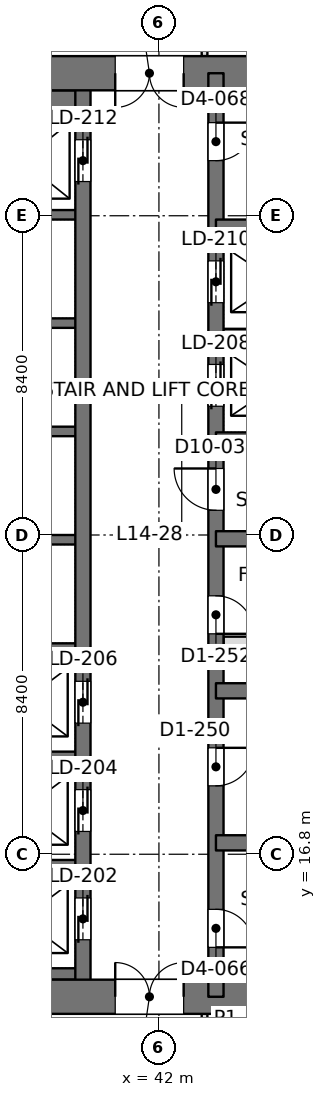
"""IFC4 building model, lengths in metres.
Left out: names, types, materials, properties, quantities, classifications, styles, units other than length and angle.
Written with IfcOpenShell. Run it as: python <this file> out.ifc"""

import sys

from ifc_helpers import new_model, si_unit, direction, frame, frame_2d, origin, place, context, subcontext, project, spatial, rectangle, extrude, element, fill, save


model = new_model("IFC4")
c1 = context("Model", 3, precision=1e-05, world=origin(), true_north=direction((0.0, 1.0)))
c2 = subcontext(c1, "Body", "Model", "MODEL_VIEW")
j1 = project(units=[si_unit("LENGTHUNIT", "METRE"), si_unit("PLANEANGLEUNIT", "RADIAN")], contexts=[c1])
p1 = place(None, origin())
s1 = spatial("IfcSite", under=j1, at=p1, CompositionType="ELEMENT")
p2 = place(p1, origin())
s2 = spatial("IfcBuilding", under=s1, at=p2, CompositionType="ELEMENT")
p3 = place(p2, frame((0.0, 0.0, 63.9)))
s3 = spatial("IfcBuildingStorey", under=s2, at=p3, CompositionType="ELEMENT", Elevation=63.9)
p4 = place(p3, frame((33.6, 13.05, 0.0), z_axis=(0.0, 0.0, 1.0), x_axis=(1.0, 0.0, 0.0)))
e1 = element("IfcWall", 1, at=p4, inside=s3, PredefinedType="SHEAR", context=c2, shape_type="SweptSolid", body=[
    extrude(rectangle(XDim=18.0, YDim=0.9, at=frame_2d((9.0, 0.0))), origin(), (0.0, 0.0, 1.0), 4.5),
])
p5 = place(p4, frame((7.25, 0.0, 0.0)))
e2 = element("IfcOpeningElement", 2, at=p5, cuts=e1, PredefinedType="OPENING", context=c2, shape_type="SweptSolid", body=[
    extrude(rectangle(XDim=1.8, YDim=2.4, at=frame_2d((0.9, 1.2))), frame((0.0, 0.46, 0.0), z_axis=(0.0, -1.0, 0.0), x_axis=(1.0, 0.0, 0.0)), (0.0, 0.0, 1.0), 0.92),
])
p6 = place(p3, frame((33.6, 37.35, 0.0), z_axis=(0.0, 0.0, 1.0), x_axis=(1.0, 0.0, 0.0)))
e3 = element("IfcWall", 3, at=p6, inside=s3, PredefinedType="SHEAR", context=c2, shape_type="SweptSolid", body=[
    extrude(rectangle(XDim=18.0, YDim=0.9, at=frame_2d((9.0, 0.0))), origin(), (0.0, 0.0, 1.0), 4.5),
])
p7 = place(p6, frame((7.25, 0.0, 0.0)))
e4 = element("IfcOpeningElement", 4, at=p7, cuts=e3, PredefinedType="OPENING", context=c2, shape_type="SweptSolid", body=[
    extrude(rectangle(XDim=1.8, YDim=2.4, at=frame_2d((0.9, 1.2))), frame((0.0, 0.46, 0.0), z_axis=(0.0, -1.0, 0.0), x_axis=(1.0, 0.0, 0.0)), (0.0, 0.0, 1.0), 0.92),
])
p8 = place(p3, frame((43.5, 13.05, 0.0), z_axis=(0.0, 0.0, 1.0), x_axis=(0.0, 1.0, 0.0)))
e5 = element("IfcWall", 5, at=p8, inside=s3, PredefinedType="SHEAR", context=c2, shape_type="SweptSolid", body=[
    extrude(rectangle(XDim=24.3, YDim=0.4, at=frame_2d((12.15, 0.0))), origin(), (0.0, 0.0, 1.0), 4.5),
])
p9 = place(p8, frame((1.3, 0.0, 0.0)))
e6 = element("IfcOpeningElement", 6, at=p9, cuts=e5, PredefinedType="OPENING", context=c2, shape_type="SweptSolid", body=[
    extrude(rectangle(XDim=1.0, YDim=2.2, at=frame_2d((0.5, 1.1))), frame((0.0, 0.21, 0.0), z_axis=(0.0, -1.0, 0.0), x_axis=(1.0, 0.0, 0.0)), (0.0, 0.0, 1.0), 0.42),
])
p10 = place(p8, frame((22.0, 0.0, 0.0)))
e7 = element("IfcOpeningElement", 7, at=p10, cuts=e5, PredefinedType="OPENING", context=c2, shape_type="SweptSolid", body=[
    extrude(rectangle(XDim=1.0, YDim=2.2, at=frame_2d((0.5, 1.1))), frame((0.0, 0.21, 0.0), z_axis=(0.0, -1.0, 0.0), x_axis=(1.0, 0.0, 0.0)), (0.0, 0.0, 1.0), 0.42),
])
p11 = place(p8, frame((5.55, 0.0, 0.0)))
e8 = element("IfcOpeningElement", 8, at=p11, cuts=e5, PredefinedType="OPENING", context=c2, shape_type="SweptSolid", body=[
    extrude(rectangle(XDim=1.0, YDim=2.2, at=frame_2d((0.5, 1.1))), frame((0.0, 0.21, 0.0), z_axis=(0.0, -1.0, 0.0), x_axis=(1.0, 0.0, 0.0)), (0.0, 0.0, 1.0), 0.42),
])
p12 = place(p8, frame((9.55, 0.0, 0.0)))
e9 = element("IfcOpeningElement", 9, at=p12, cuts=e5, PredefinedType="OPENING", context=c2, shape_type="SweptSolid", body=[
    extrude(rectangle(XDim=1.0, YDim=2.2, at=frame_2d((0.5, 1.1))), frame((0.0, 0.21, 0.0), z_axis=(0.0, -1.0, 0.0), x_axis=(1.0, 0.0, 0.0)), (0.0, 0.0, 1.0), 0.42),
])
p13 = place(p8, frame((12.8, 0.0, 0.0)))
e10 = element("IfcOpeningElement", 10, at=p13, cuts=e5, PredefinedType="OPENING", context=c2, shape_type="SweptSolid", body=[
    extrude(rectangle(XDim=1.1, YDim=2.2, at=frame_2d((0.55, 1.1))), frame((0.0, 0.21, 0.0), z_axis=(0.0, -1.0, 0.0), x_axis=(1.0, 0.0, 0.0)), (0.0, 0.0, 1.0), 0.42),
])
p14 = place(p8, frame((15.538, 0.0, 0.0)))
e11 = element("IfcOpeningElement", 11, at=p14, cuts=e5, PredefinedType="OPENING", context=c2, shape_type="SweptSolid", body=[
    extrude(rectangle(XDim=1.1, YDim=2.2, at=frame_2d((0.55, 1.1))), frame((0.0, 0.21, 0.0), z_axis=(0.0, -1.0, 0.0), x_axis=(1.0, 0.0, 0.0)), (0.0, 0.0, 1.0), 0.42),
])
p15 = place(p8, frame((18.262, 0.0, 0.0)))
e12 = element("IfcOpeningElement", 12, at=p15, cuts=e5, PredefinedType="OPENING", context=c2, shape_type="SweptSolid", body=[
    extrude(rectangle(XDim=1.1, YDim=2.2, at=frame_2d((0.55, 1.1))), frame((0.0, 0.21, 0.0), z_axis=(0.0, -1.0, 0.0), x_axis=(1.0, 0.0, 0.0)), (0.0, 0.0, 1.0), 0.42),
])
p16 = place(p3, frame((40.0, 13.05, 0.0), z_axis=(0.0, 0.0, 1.0), x_axis=(0.0, 1.0, 0.0)))
e13 = element("IfcWall", 13, at=p16, inside=s3, PredefinedType="SHEAR", context=c2, shape_type="SweptSolid", body=[
    extrude(rectangle(XDim=24.3, YDim=0.4, at=frame_2d((12.15, 0.0))), origin(), (0.0, 0.0, 1.0), 4.5),
])
p17 = place(p16, frame((1.5, 0.0, 0.0)))
e14 = element("IfcOpeningElement", 14, at=p17, cuts=e13, PredefinedType="OPENING", context=c2, shape_type="SweptSolid", body=[
    extrude(rectangle(XDim=1.1, YDim=2.2, at=frame_2d((0.55, 1.1))), frame((0.0, 0.21, 0.0), z_axis=(0.0, -1.0, 0.0), x_axis=(1.0, 0.0, 0.0)), (0.0, 0.0, 1.0), 0.42),
])
p18 = place(p16, frame((4.35, 0.0, 0.0)))
e15 = element("IfcOpeningElement", 15, at=p18, cuts=e13, PredefinedType="OPENING", context=c2, shape_type="SweptSolid", body=[
    extrude(rectangle(XDim=1.1, YDim=2.2, at=frame_2d((0.55, 1.1))), frame((0.0, 0.21, 0.0), z_axis=(0.0, -1.0, 0.0), x_axis=(1.0, 0.0, 0.0)), (0.0, 0.0, 1.0), 0.42),
])
p19 = place(p16, frame((7.2, 0.0, 0.0)))
e16 = element("IfcOpeningElement", 16, at=p19, cuts=e13, PredefinedType="OPENING", context=c2, shape_type="SweptSolid", body=[
    extrude(rectangle(XDim=1.1, YDim=2.2, at=frame_2d((0.55, 1.1))), frame((0.0, 0.21, 0.0), z_axis=(0.0, -1.0, 0.0), x_axis=(1.0, 0.0, 0.0)), (0.0, 0.0, 1.0), 0.42),
])
p20 = place(p16, frame((21.45, 0.0, 0.0)))
e17 = element("IfcOpeningElement", 17, at=p20, cuts=e13, PredefinedType="OPENING", context=c2, shape_type="SweptSolid", body=[
    extrude(rectangle(XDim=1.1, YDim=2.2, at=frame_2d((0.55, 1.1))), frame((0.0, 0.21, 0.0), z_axis=(0.0, -1.0, 0.0), x_axis=(1.0, 0.0, 0.0)), (0.0, 0.0, 1.0), 0.42),
])
for number, where, z_axis, x_axis in (
    (18, (51.15, 17.1, 0.0), (0.0, 0.0, 1.0), (-1.0, 0.0, 0.0)),
    (19, (51.15, 21.1, 0.0), (0.0, 0.0, 1.0), (-1.0, 0.0, 0.0)),
    (20, (51.15, 25.1, 0.0), (0.0, 0.0, 1.0), (-1.0, 0.0, 0.0)),
    (21, (51.15, 27.7, 0.0), (0.0, 0.0, 1.0), (-1.0, 0.0, 0.0)),
    (22, (51.15, 33.3, 0.0), (0.0, 0.0, 1.0), (-1.0, 0.0, 0.0)),
):
    element("IfcWall", number, at=place(p3, frame(where, z_axis=z_axis, x_axis=x_axis)), inside=s3, PredefinedType="SHEAR", context=c2, shape_type="SweptSolid", body=[
        extrude(rectangle(XDim=7.65, YDim=0.4, at=frame_2d((3.825, 0.0))), origin(), (0.0, 0.0, 1.0), 4.5),
    ])
p21 = place(p3, frame((46.7, 30.5, 0.0), z_axis=(0.0, 0.0, 1.0), x_axis=(-1.0, 0.0, 0.0)))
e23 = element("IfcWall", 23, at=p21, inside=s3, PredefinedType="SHEAR", context=c2, shape_type="SweptSolid", body=[
    extrude(rectangle(XDim=3.2, YDim=0.25, at=frame_2d((1.6, 0.0))), origin(), (0.0, 0.0, 1.0), 4.5),
])
p22 = place(p3, frame((40.0, 13.65, 0.0), z_axis=(0.0, 0.0, 1.0), x_axis=(-1.0, 0.0, 0.0)))
e24 = element("IfcWall", 24, at=p22, inside=s3, PredefinedType="SHEAR", context=c2, shape_type="SweptSolid", body=[
    extrude(rectangle(XDim=3.2, YDim=0.3, at=frame_2d((1.6, 0.0))), origin(), (0.0, 0.0, 1.0), 4.5),
])
for number, where, z_axis, x_axis in (
    (25, (40.0, 16.525, 0.0), (0.0, 0.0, 1.0), (-1.0, 0.0, 0.0)),
    (26, (40.0, 19.375, 0.0), (0.0, 0.0, 1.0), (-1.0, 0.0, 0.0)),
    (27, (40.0, 22.225, 0.0), (0.0, 0.0, 1.0), (-1.0, 0.0, 0.0)),
    (28, (40.0, 25.075, 0.0), (0.0, 0.0, 1.0), (-1.0, 0.0, 0.0)),
    (29, (40.0, 27.925, 0.0), (0.0, 0.0, 1.0), (-1.0, 0.0, 0.0)),
    (30, (40.0, 30.775, 0.0), (0.0, 0.0, 1.0), (-1.0, 0.0, 0.0)),
    (31, (40.0, 33.625, 0.0), (0.0, 0.0, 1.0), (-1.0, 0.0, 0.0)),
):
    element("IfcWall", number, at=place(p3, frame(where, z_axis=z_axis, x_axis=x_axis)), inside=s3, PredefinedType="SHEAR", context=c2, shape_type="SweptSolid", body=[
        extrude(rectangle(XDim=3.2, YDim=0.25, at=frame_2d((1.6, 0.0))), origin(), (0.0, 0.0, 1.0), 4.5),
    ])
p23 = place(p3, frame((40.0, 36.625, 0.0), z_axis=(0.0, 0.0, 1.0), x_axis=(-1.0, 0.0, 0.0)))
e32 = element("IfcWall", 32, at=p23, inside=s3, PredefinedType="SHEAR", context=c2, shape_type="SweptSolid", body=[
    extrude(rectangle(XDim=3.2, YDim=0.55, at=frame_2d((1.6, 0.0))), origin(), (0.0, 0.0, 1.0), 4.5),
])
p24 = place(p3, frame((43.2, 10.074, 0.0), z_axis=(0.0, 0.0, 1.0), x_axis=(0.0, 1.0, 0.0)))
e33 = element("IfcWall", 33, at=p24, inside=s3, PredefinedType="PARTITIONING", context=c2, shape_type="SweptSolid", body=[
    extrude(rectangle(XDim=2.528, YDim=0.15, at=frame_2d((1.264, 0.0))), origin(), (0.0, 0.0, 1.0), 4.34),
])
p25 = place(p24, frame((0.726, 0.0, 0.0)))
e34 = element("IfcOpeningElement", 34, at=p25, cuts=e33, PredefinedType="OPENING", context=c2, shape_type="SweptSolid", body=[
    extrude(rectangle(XDim=1.0, YDim=2.2, at=frame_2d((0.5, 1.1))), frame((0.0, 0.085, 0.0), z_axis=(0.0, -1.0, 0.0), x_axis=(1.0, 0.0, 0.0)), (0.0, 0.0, 1.0), 0.17),
])
p26 = place(p3, frame((43.2, 37.8, 0.0), z_axis=(0.0, 0.0, 1.0), x_axis=(0.0, 1.0, 0.0)))
e35 = element("IfcWall", 35, at=p26, inside=s3, PredefinedType="PARTITIONING", context=c2, shape_type="SweptSolid", body=[
    extrude(rectangle(XDim=2.526, YDim=0.15, at=frame_2d((1.263, 0.0))), origin(), (0.0, 0.0, 1.0), 4.34),
])
p27 = place(p26, frame((0.8, 0.0, 0.0)))
e36 = element("IfcOpeningElement", 36, at=p27, cuts=e35, PredefinedType="OPENING", context=c2, shape_type="SweptSolid", body=[
    extrude(rectangle(XDim=1.0, YDim=2.2, at=frame_2d((0.5, 1.1))), frame((0.0, 0.085, 0.0), z_axis=(0.0, -1.0, 0.0), x_axis=(1.0, 0.0, 0.0)), (0.0, 0.0, 1.0), 0.17),
])
p28 = place(p3, frame((43.7, 22.4, 0.0), z_axis=(0.0, 0.0, 1.0), x_axis=(1.0, 0.0, 0.0)))
e37 = element("IfcWall", 37, at=p28, inside=s3, PredefinedType="PARTITIONING", context=c2, shape_type="SweptSolid", body=[
    extrude(rectangle(XDim=6.6, YDim=0.25, at=frame_2d((3.3, 0.0))), origin(), (0.0, 0.0, 1.0), 4.3),
])
p29 = place(p28, frame((2.825, 0.0, 0.0)))
e38 = element("IfcOpeningElement", 38, at=p29, cuts=e37, PredefinedType="OPENING", context=c2, shape_type="SweptSolid", body=[
    extrude(rectangle(XDim=0.9, YDim=2.2, at=frame_2d((0.45, 1.1))), frame((0.0, 0.135, 0.0), z_axis=(0.0, -1.0, 0.0), x_axis=(1.0, 0.0, 0.0)), (0.0, 0.0, 1.0), 0.27),
])
p30 = place(p5, origin())
e39 = element("IfcDoor", 39, at=p30, inside=s3, OperationType="DOUBLE_DOOR_SINGLE_SWING", PredefinedType="DOOR", context=c2, shape_type="SweptSolid", body=[
    extrude(rectangle(XDim=1.8, YDim=2.4, at=frame_2d((0.9, 1.2))), frame((0.0, 0.025, 0.0), z_axis=(0.0, -1.0, 0.0), x_axis=(1.0, 0.0, 0.0)), (0.0, 0.0, 1.0), 0.05),
])
fill(e2, e39)
p31 = place(p7, frame((1.8, 0.0, 0.0), z_axis=(0.0, 0.0, 1.0), x_axis=(-1.0, 0.0, 0.0)))
e40 = element("IfcDoor", 40, at=p31, inside=s3, OperationType="DOUBLE_DOOR_SINGLE_SWING", PredefinedType="DOOR", context=c2, shape_type="SweptSolid", body=[
    extrude(rectangle(XDim=1.8, YDim=2.4, at=frame_2d((0.9, 1.2))), frame((0.0, 0.025, 0.0), z_axis=(0.0, -1.0, 0.0), x_axis=(1.0, 0.0, 0.0)), (0.0, 0.0, 1.0), 0.05),
])
fill(e4, e40)
p32 = place(p9, frame((1.0, 0.0, 0.0), z_axis=(0.0, 0.0, 1.0), x_axis=(-1.0, 0.0, 0.0)))
e41 = element("IfcDoor", 41, at=p32, inside=s3, OperationType="SINGLE_SWING_RIGHT", PredefinedType="DOOR", context=c2, shape_type="SweptSolid", body=[
    extrude(rectangle(XDim=1.0, YDim=2.2, at=frame_2d((0.5, 1.1))), frame((0.0, 0.025, 0.0), z_axis=(0.0, -1.0, 0.0), x_axis=(1.0, 0.0, 0.0)), (0.0, 0.0, 1.0), 0.05),
])
fill(e6, e41)
p33 = place(p10, frame((1.0, 0.0, 0.0), z_axis=(0.0, 0.0, 1.0), x_axis=(-1.0, 0.0, 0.0)))
e42 = element("IfcDoor", 42, at=p33, inside=s3, OperationType="SINGLE_SWING_LEFT", PredefinedType="DOOR", context=c2, shape_type="SweptSolid", body=[
    extrude(rectangle(XDim=1.0, YDim=2.2, at=frame_2d((0.5, 1.1))), frame((0.0, 0.025, 0.0), z_axis=(0.0, -1.0, 0.0), x_axis=(1.0, 0.0, 0.0)), (0.0, 0.0, 1.0), 0.05),
])
fill(e7, e42)
p34 = place(p11, frame((1.0, 0.0, 0.0), z_axis=(0.0, 0.0, 1.0), x_axis=(-1.0, 0.0, 0.0)))
e43 = element("IfcDoor", 43, at=p34, inside=s3, OperationType="SINGLE_SWING_LEFT", PredefinedType="DOOR", context=c2, shape_type="SweptSolid", body=[
    extrude(rectangle(XDim=1.0, YDim=2.2, at=frame_2d((0.5, 1.1))), frame((0.0, 0.025, 0.0), z_axis=(0.0, -1.0, 0.0), x_axis=(1.0, 0.0, 0.0)), (0.0, 0.0, 1.0), 0.05),
])
fill(e8, e43)
p35 = place(p12, frame((1.0, 0.0, 0.0), z_axis=(0.0, 0.0, 1.0), x_axis=(-1.0, 0.0, 0.0)))
e44 = element("IfcDoor", 44, at=p35, inside=s3, OperationType="SINGLE_SWING_RIGHT", PredefinedType="DOOR", context=c2, shape_type="SweptSolid", body=[
    extrude(rectangle(XDim=1.0, YDim=2.2, at=frame_2d((0.5, 1.1))), frame((0.0, 0.025, 0.0), z_axis=(0.0, -1.0, 0.0), x_axis=(1.0, 0.0, 0.0)), (0.0, 0.0, 1.0), 0.05),
])
fill(e9, e44)
p36 = place(p13, origin())
e45 = element("IfcDoor", 45, at=p36, inside=s3, OperationType="SINGLE_SWING_RIGHT", PredefinedType="DOOR", context=c2, shape_type="SweptSolid", body=[
    extrude(rectangle(XDim=1.1, YDim=2.2, at=frame_2d((0.55, 1.1))), frame((0.0, 0.025, 0.0), z_axis=(0.0, -1.0, 0.0), x_axis=(1.0, 0.0, 0.0)), (0.0, 0.0, 1.0), 0.05),
])
fill(e10, e45)
p37 = place(p17, origin())
e46 = element("IfcDoor", 46, at=p37, inside=s3, OperationType="DOUBLE_DOOR_SLIDING", PredefinedType="DOOR", context=c2, shape_type="SweptSolid", body=[
    extrude(rectangle(XDim=1.1, YDim=2.2, at=frame_2d((0.55, 1.1))), frame((0.0, 0.025, 0.0), z_axis=(0.0, -1.0, 0.0), x_axis=(1.0, 0.0, 0.0)), (0.0, 0.0, 1.0), 0.05),
])
fill(e14, e46)
p38 = place(p18, origin())
e47 = element("IfcDoor", 47, at=p38, inside=s3, OperationType="DOUBLE_DOOR_SLIDING", PredefinedType="DOOR", context=c2, shape_type="SweptSolid", body=[
    extrude(rectangle(XDim=1.1, YDim=2.2, at=frame_2d((0.55, 1.1))), frame((0.0, 0.025, 0.0), z_axis=(0.0, -1.0, 0.0), x_axis=(1.0, 0.0, 0.0)), (0.0, 0.0, 1.0), 0.05),
])
fill(e15, e47)
p39 = place(p19, origin())
e48 = element("IfcDoor", 48, at=p39, inside=s3, OperationType="DOUBLE_DOOR_SLIDING", PredefinedType="DOOR", context=c2, shape_type="SweptSolid", body=[
    extrude(rectangle(XDim=1.1, YDim=2.2, at=frame_2d((0.55, 1.1))), frame((0.0, 0.025, 0.0), z_axis=(0.0, -1.0, 0.0), x_axis=(1.0, 0.0, 0.0)), (0.0, 0.0, 1.0), 0.05),
])
fill(e16, e48)
p40 = place(p20, origin())
e49 = element("IfcDoor", 49, at=p40, inside=s3, OperationType="DOUBLE_DOOR_SLIDING", PredefinedType="DOOR", context=c2, shape_type="SweptSolid", body=[
    extrude(rectangle(XDim=1.1, YDim=2.2, at=frame_2d((0.55, 1.1))), frame((0.0, 0.025, 0.0), z_axis=(0.0, -1.0, 0.0), x_axis=(1.0, 0.0, 0.0)), (0.0, 0.0, 1.0), 0.05),
])
fill(e17, e49)
p41 = place(p14, origin())
e50 = element("IfcDoor", 50, at=p41, inside=s3, OperationType="DOUBLE_DOOR_SLIDING", PredefinedType="DOOR", context=c2, shape_type="SweptSolid", body=[
    extrude(rectangle(XDim=1.1, YDim=2.2, at=frame_2d((0.55, 1.1))), frame((0.0, 0.025, 0.0), z_axis=(0.0, -1.0, 0.0), x_axis=(1.0, 0.0, 0.0)), (0.0, 0.0, 1.0), 0.05),
])
fill(e11, e50)
p42 = place(p15, origin())
e51 = element("IfcDoor", 51, at=p42, inside=s3, OperationType="DOUBLE_DOOR_SLIDING", PredefinedType="DOOR", context=c2, shape_type="SweptSolid", body=[
    extrude(rectangle(XDim=1.1, YDim=2.2, at=frame_2d((0.55, 1.1))), frame((0.0, 0.025, 0.0), z_axis=(0.0, -1.0, 0.0), x_axis=(1.0, 0.0, 0.0)), (0.0, 0.0, 1.0), 0.05),
])
fill(e12, e51)
save(model, sys.argv[1])
